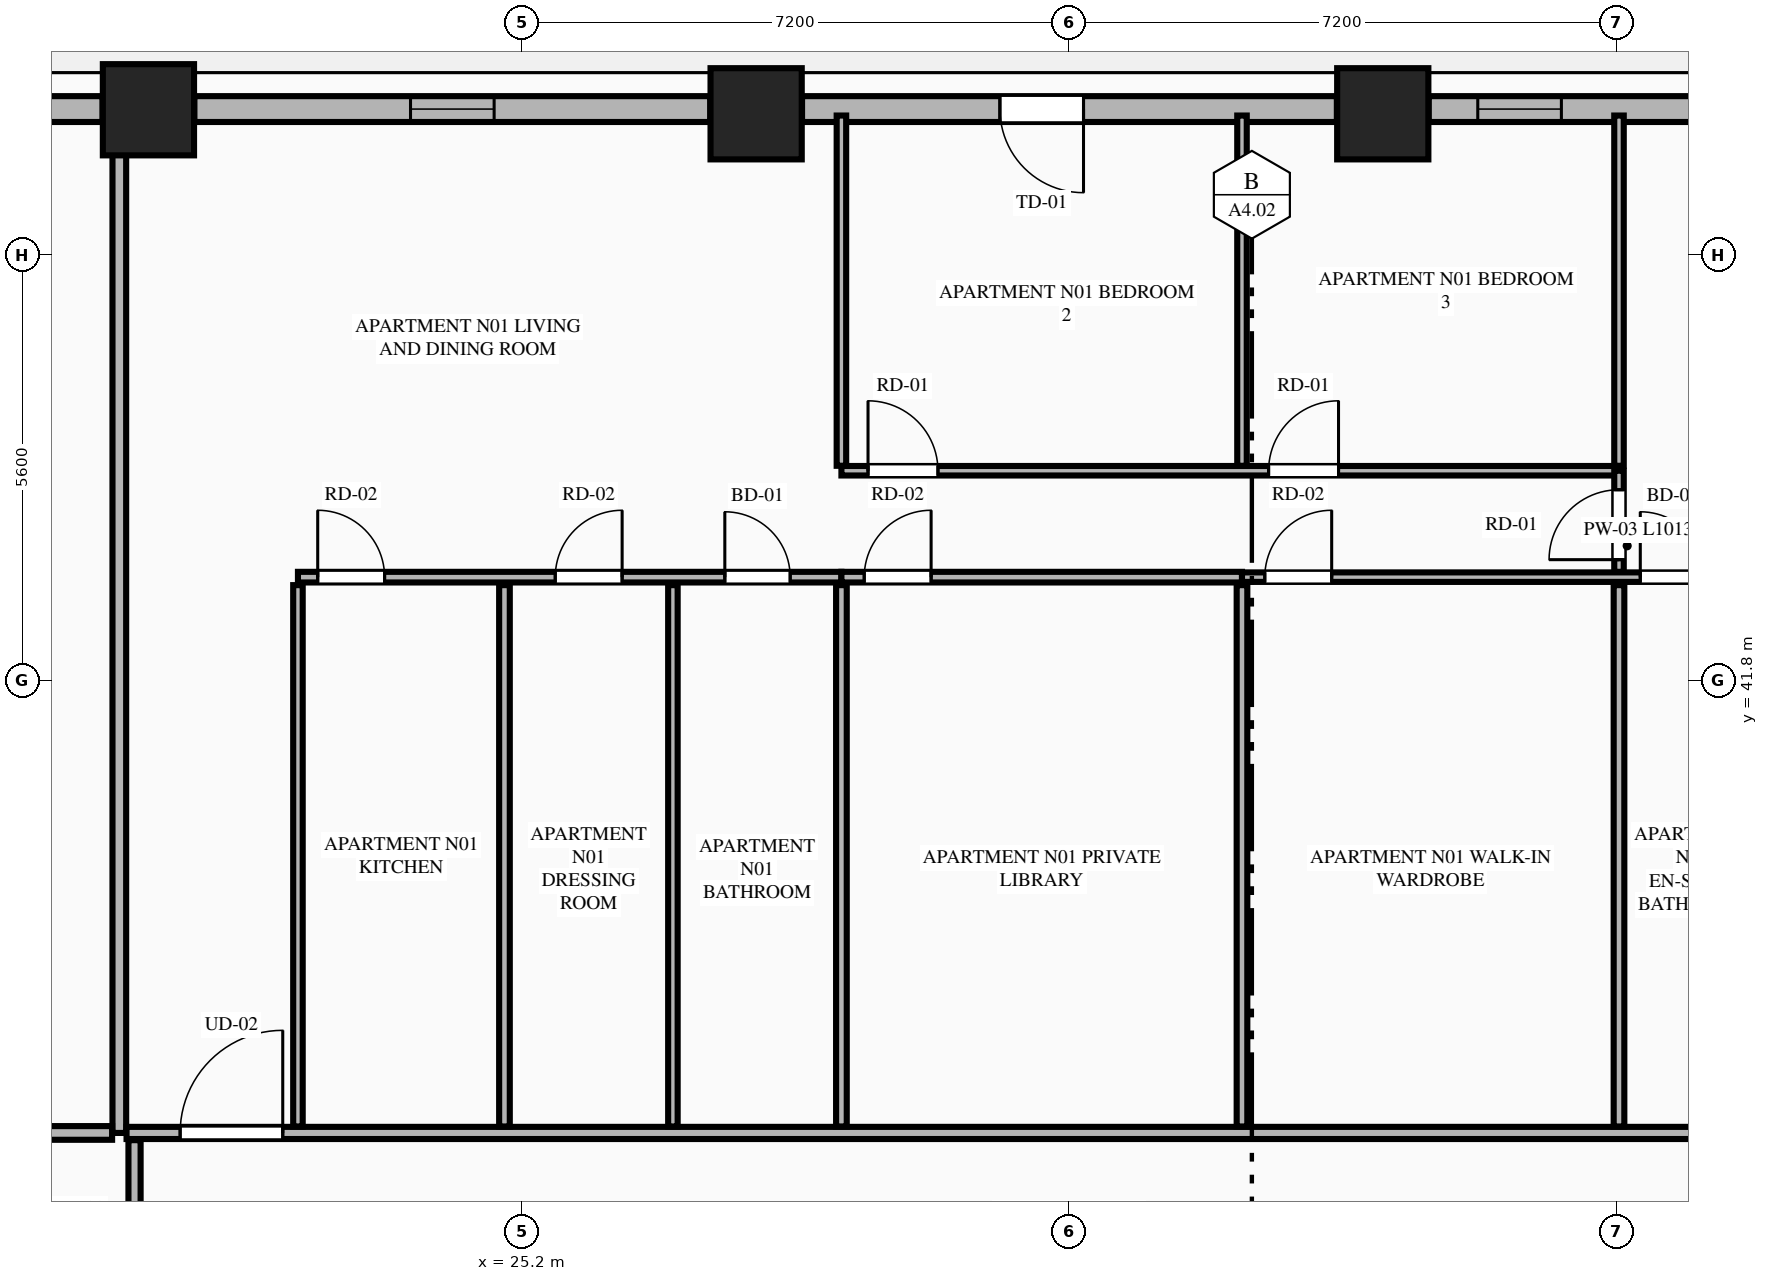
"""IFC4 building model, lengths in metres.
Left out: names, types, materials, properties, quantities, classifications, styles, units other than length and angle.
Written with IfcOpenShell. Run it as: python <this file> out.ifc"""

import sys

from ifc_helpers import new_model, si_unit, direction, frame, frame_2d, origin, origin_2d, place, context, subcontext, project, spatial, rectangle, extrude, element, fill, save


model = new_model("IFC4")
c1 = context("Model", 3, precision=1e-05, world=origin(), true_north=direction((0.0, 1.0)))
c2 = subcontext(c1, "Body", "Model", "MODEL_VIEW")
j1 = project(units=[si_unit("LENGTHUNIT", "METRE"), si_unit("PLANEANGLEUNIT", "RADIAN")], contexts=[c1])
p1 = place(None, origin())
s1 = spatial("IfcSite", under=j1, at=p1, CompositionType="ELEMENT")
p2 = place(p1, origin())
s2 = spatial("IfcBuilding", under=s1, at=p2, CompositionType="ELEMENT")
p3 = place(p2, frame((0.0, 0.0, 42.65)))
s3 = spatial("IfcBuildingStorey", under=s2, at=p3, CompositionType="ELEMENT", Elevation=42.65)
for number, where, z_axis, x_axis in (
    (1, (36.522, 49.258, 0.0), (0.0, 0.0, 1.0), (1.0, 0.0, 0.0)),
    (2, (28.278, 49.258, 0.0), (0.0, 0.0, 1.0), (1.0, 0.0, 0.0)),
    (3, (20.283, 49.311, 0.0), (0.0, 0.0, 1.0), (1.0, 0.0, 0.0)),
):
    element("IfcColumn", number, at=place(p3, frame(where, z_axis=z_axis, x_axis=x_axis)), inside=s3, PredefinedType="COLUMN", context=c2, shape_type="SweptSolid", body=[
        extrude(rectangle(XDim=1.2, YDim=1.2, at=origin_2d()), origin(), (0.0, 0.0, 1.0), 3.55),
    ])
p4 = place(p3, frame((43.913, 49.32, 0.0), z_axis=(0.0, 0.0, 1.0), x_axis=(-1.0, 0.0, 0.0)))
e4 = element("IfcWall", 4, at=p4, inside=s3, PredefinedType="STANDARD", context=c2, shape_type="SweptSolid", body=[
    extrude(rectangle(XDim=6.787, YDim=0.34, at=frame_2d((3.394, 0.0))), origin(), (0.0, 0.0, 1.0), 2.787),
])
p5 = place(p4, frame((1.535, 0.0, 0.75)))
e5 = element("IfcOpeningElement", 5, at=p5, cuts=e4, PredefinedType="OPENING", context=c2, shape_type="SweptSolid", body=[
    extrude(rectangle(XDim=1.1, YDim=1.887, at=frame_2d((0.55, 0.943))), frame((0.0, 0.18, 0.0), z_axis=(0.0, -1.0, 0.0), x_axis=(1.0, 0.0, 0.0)), (0.0, 0.0, 1.0), 0.36),
])
p6 = place(p4, frame((5.041, 0.0, 0.75)))
e6 = element("IfcOpeningElement", 6, at=p6, cuts=e4, PredefinedType="OPENING", context=c2, shape_type="SweptSolid", body=[
    extrude(rectangle(XDim=1.1, YDim=1.887, at=frame_2d((0.55, 0.943))), frame((0.0, 0.18, 0.0), z_axis=(0.0, -1.0, 0.0), x_axis=(1.0, 0.0, 0.0)), (0.0, 0.0, 1.0), 0.36),
])
p7 = place(p3, frame((35.918, 49.32, 0.0), z_axis=(0.0, 0.0, 1.0), x_axis=(-1.0, 0.0, 0.0)))
e7 = element("IfcWall", 7, at=p7, inside=s3, PredefinedType="STANDARD", context=c2, shape_type="SweptSolid", body=[
    extrude(rectangle(XDim=7.036, YDim=0.34, at=frame_2d((3.518, 0.0))), origin(), (0.0, 0.0, 1.0), 2.787),
])
p8 = place(p7, frame((3.333, 0.0, 0.0)))
e8 = element("IfcOpeningElement", 8, at=p8, cuts=e7, PredefinedType="OPENING", context=c2, shape_type="SweptSolid", body=[
    extrude(rectangle(XDim=1.1, YDim=2.25, at=frame_2d((0.55, 1.125))), frame((0.0, 0.18, 0.0), z_axis=(0.0, -1.0, 0.0), x_axis=(1.0, 0.0, 0.0)), (0.0, 0.0, 1.0), 0.36),
])
p9 = place(p3, frame((27.674, 49.32, 0.0), z_axis=(0.0, 0.0, 1.0), x_axis=(-1.0, 0.0, 0.0)))
e9 = element("IfcWall", 9, at=p9, inside=s3, PredefinedType="STANDARD", context=c2, shape_type="SweptSolid", body=[
    extrude(rectangle(XDim=6.787, YDim=0.34, at=frame_2d((3.394, 0.0))), origin(), (0.0, 0.0, 1.0), 2.787),
])
p10 = place(p9, frame((2.843, 0.0, 0.75)))
e10 = element("IfcOpeningElement", 10, at=p10, cuts=e9, PredefinedType="OPENING", context=c2, shape_type="SweptSolid", body=[
    extrude(rectangle(XDim=1.1, YDim=1.887, at=frame_2d((0.55, 0.943))), frame((0.0, 0.18, 0.0), z_axis=(0.0, -1.0, 0.0), x_axis=(1.0, 0.0, 0.0)), (0.0, 0.0, 1.0), 0.36),
])
p11 = place(p3, frame((19.679, 49.32, 0.0), z_axis=(0.0, 0.0, 1.0), x_axis=(-1.0, 0.0, 0.0)))
e11 = element("IfcWall", 11, at=p11, inside=s3, PredefinedType="STANDARD", context=c2, shape_type="SweptSolid", body=[
    extrude(rectangle(XDim=1.245, YDim=0.34, at=frame_2d((0.623, 0.0))), origin(), (0.0, 0.0, 1.0), 3.33),
])
p12 = place(p3, frame((19.9, 35.85, 0.0), z_axis=(0.0, 0.0, 1.0), x_axis=(0.0, 1.0, 0.0)))
e12 = element("IfcWall", 12, at=p12, inside=s3, PredefinedType="PARTITIONING", context=c2, shape_type="SweptSolid", body=[
    extrude(rectangle(XDim=13.295, YDim=0.18, at=frame_2d((6.647, 0.0))), origin(), (0.0, 0.0, 1.0), 3.33),
])
p13 = place(p3, frame((19.995, 35.85, 0.0), z_axis=(0.0, 0.0, 1.0), x_axis=(1.0, 0.0, 0.0)))
e13 = element("IfcWall", 13, at=p13, inside=s3, PredefinedType="PARTITIONING", context=c2, shape_type="SweptSolid", body=[
    extrude(rectangle(XDim=24.81, YDim=0.16, at=frame_2d((12.405, 0.0))), origin(), (0.0, 0.0, 1.0), 3.33),
])
p14 = place(p13, frame((0.705, 0.0, 0.0)))
e14 = element("IfcOpeningElement", 14, at=p14, cuts=e13, PredefinedType="OPENING", context=c2, shape_type="SweptSolid", body=[
    extrude(rectangle(XDim=1.35, YDim=2.35, at=frame_2d((0.675, 1.175))), frame((0.0, 0.09, 0.0), z_axis=(0.0, -1.0, 0.0), x_axis=(1.0, 0.0, 0.0)), (0.0, 0.0, 1.0), 0.18),
])
p15 = place(p3, frame((22.25, 35.935, 0.0), z_axis=(0.0, 0.0, 1.0), x_axis=(0.0, 1.0, 0.0)))
e15 = element("IfcWall", 15, at=p15, inside=s3, PredefinedType="PARTITIONING", context=c2, shape_type="SweptSolid", body=[
    extrude(rectangle(XDim=7.122, YDim=0.125, at=frame_2d((3.561, 0.0))), origin(), (0.0, 0.0, 1.0), 2.7),
])
p16 = place(p3, frame((22.25, 43.162, 0.0), z_axis=(0.0, 0.0, 1.0), x_axis=(1.0, 0.0, 0.0)))
e16 = element("IfcWall", 16, at=p16, inside=s3, PredefinedType="PLUMBINGWALL", context=c2, shape_type="SweptSolid", body=[
    extrude(rectangle(XDim=7.15, YDim=0.14, at=frame_2d((3.575, 0.0))), origin(), (0.0, 0.0, 1.0), 3.33),
])
p17 = place(p16, frame((5.616, 0.0, 0.0)))
e17 = element("IfcOpeningElement", 17, at=p17, cuts=e16, PredefinedType="OPENING", context=c2, shape_type="SweptSolid", body=[
    extrude(rectangle(XDim=0.86, YDim=2.1, at=frame_2d((0.43, 1.05))), frame((0.0, 0.08, 0.0), z_axis=(0.0, -1.0, 0.0), x_axis=(1.0, 0.0, 0.0)), (0.0, 0.0, 1.0), 0.16),
])
p18 = place(p16, frame((0.26, 0.0, 0.0)))
e18 = element("IfcOpeningElement", 18, at=p18, cuts=e16, PredefinedType="OPENING", context=c2, shape_type="SweptSolid", body=[
    extrude(rectangle(XDim=0.88, YDim=2.15, at=frame_2d((0.44, 1.075))), frame((0.0, 0.08, 0.0), z_axis=(0.0, -1.0, 0.0), x_axis=(1.0, 0.0, 0.0)), (0.0, 0.0, 1.0), 0.16),
])
p19 = place(p16, frame((3.385, 0.0, 0.0)))
e19 = element("IfcOpeningElement", 19, at=p19, cuts=e16, PredefinedType="OPENING", context=c2, shape_type="SweptSolid", body=[
    extrude(rectangle(XDim=0.88, YDim=2.15, at=frame_2d((0.44, 1.075))), frame((0.0, 0.08, 0.0), z_axis=(0.0, -1.0, 0.0), x_axis=(1.0, 0.0, 0.0)), (0.0, 0.0, 1.0), 0.16),
])
p20 = place(p3, frame((29.4, 43.162, 0.0), z_axis=(0.0, 0.0, 1.0), x_axis=(1.0, 0.0, 0.0)))
e20 = element("IfcWall", 20, at=p20, inside=s3, PredefinedType="PLUMBINGWALL", context=c2, shape_type="SweptSolid", body=[
    extrude(rectangle(XDim=5.27, YDim=0.14, at=frame_2d((2.635, 0.0))), origin(), (0.0, 0.0, 1.0), 3.33),
])
p21 = place(p20, frame((0.3, 0.0, 0.0)))
e21 = element("IfcOpeningElement", 21, at=p21, cuts=e20, PredefinedType="OPENING", context=c2, shape_type="SweptSolid", body=[
    extrude(rectangle(XDim=0.88, YDim=2.15, at=frame_2d((0.44, 1.075))), frame((0.0, 0.08, 0.0), z_axis=(0.0, -1.0, 0.0), x_axis=(1.0, 0.0, 0.0)), (0.0, 0.0, 1.0), 0.16),
])
p22 = place(p3, frame((34.67, 43.162, 0.0), z_axis=(0.0, 0.0, 1.0), x_axis=(1.0, 0.0, 0.0)))
e22 = element("IfcWall", 22, at=p22, inside=s3, PredefinedType="PARTITIONING", context=c2, shape_type="SweptSolid", body=[
    extrude(rectangle(XDim=10.135, YDim=0.125, at=frame_2d((5.067, 0.0))), origin(), (0.0, 0.0, 1.0), 3.33),
])
p23 = place(p22, frame((5.24, 0.0, 0.0)))
e23 = element("IfcOpeningElement", 23, at=p23, cuts=e22, PredefinedType="OPENING", context=c2, shape_type="SweptSolid", body=[
    extrude(rectangle(XDim=0.86, YDim=2.1, at=frame_2d((0.43, 1.05))), frame((0.0, 0.073, 0.0), z_axis=(0.0, -1.0, 0.0), x_axis=(1.0, 0.0, 0.0)), (0.0, 0.0, 1.0), 0.145),
])
p24 = place(p22, frame((7.17, 0.0, 0.0)))
e24 = element("IfcOpeningElement", 24, at=p24, cuts=e22, PredefinedType="OPENING", context=c2, shape_type="SweptSolid", body=[
    extrude(rectangle(XDim=0.88, YDim=2.15, at=frame_2d((0.44, 1.075))), frame((0.0, 0.073, 0.0), z_axis=(0.0, -1.0, 0.0), x_axis=(1.0, 0.0, 0.0)), (0.0, 0.0, 1.0), 0.145),
])
p25 = place(p22, frame((0.3, 0.0, 0.0)))
e25 = element("IfcOpeningElement", 25, at=p25, cuts=e22, PredefinedType="OPENING", context=c2, shape_type="SweptSolid", body=[
    extrude(rectangle(XDim=0.88, YDim=2.15, at=frame_2d((0.44, 1.075))), frame((0.0, 0.073, 0.0), z_axis=(0.0, -1.0, 0.0), x_axis=(1.0, 0.0, 0.0)), (0.0, 0.0, 1.0), 0.145),
])
p26 = place(p3, frame((24.967, 35.935, 0.0), z_axis=(0.0, 0.0, 1.0), x_axis=(0.0, 1.0, 0.0)))
e26 = element("IfcWall", 26, at=p26, inside=s3, PredefinedType="PLUMBINGWALL", context=c2, shape_type="SweptSolid", body=[
    extrude(rectangle(XDim=7.122, YDim=0.14, at=frame_2d((3.561, 0.0))), origin(), (0.0, 0.0, 1.0), 3.33),
])
p27 = place(p3, frame((27.183, 35.935, 0.0), z_axis=(0.0, 0.0, 1.0), x_axis=(0.0, 1.0, 0.0)))
e27 = element("IfcWall", 27, at=p27, inside=s3, PredefinedType="PARTITIONING", context=c2, shape_type="SweptSolid", body=[
    extrude(rectangle(XDim=7.122, YDim=0.125, at=frame_2d((3.561, 0.0))), origin(), (0.0, 0.0, 1.0), 3.33),
])
p28 = place(p3, frame((29.4, 44.627, 0.0), z_axis=(0.0, 0.0, 1.0), x_axis=(0.0, 1.0, 0.0)))
e28 = element("IfcWall", 28, at=p28, inside=s3, PredefinedType="PARTITIONING", context=c2, shape_type="SweptSolid", body=[
    extrude(rectangle(XDim=4.608, YDim=0.125, at=frame_2d((2.304, 0.0))), origin(), (0.0, 0.0, 1.0), 3.33),
])
p29 = place(p3, frame((29.4, 44.562, 0.0), z_axis=(0.0, 0.0, 1.0), x_axis=(1.0, 0.0, 0.0)))
e29 = element("IfcWall", 29, at=p29, inside=s3, PredefinedType="PARTITIONING", context=c2, shape_type="SweptSolid", body=[
    extrude(rectangle(XDim=10.23, YDim=0.125, at=frame_2d((5.115, 0.0))), origin(), (0.0, 0.0, 1.0), 3.33),
])
p30 = place(p29, frame((0.35, 0.0, 0.0)))
e30 = element("IfcOpeningElement", 30, at=p30, cuts=e29, PredefinedType="OPENING", context=c2, shape_type="SweptSolid", body=[
    extrude(rectangle(XDim=0.92, YDim=2.15, at=frame_2d((0.46, 1.075))), frame((0.0, 0.073, 0.0), z_axis=(0.0, -1.0, 0.0), x_axis=(1.0, 0.0, 0.0)), (0.0, 0.0, 1.0), 0.145),
])
p31 = place(p29, frame((5.62, 0.0, 0.0)))
e31 = element("IfcOpeningElement", 31, at=p31, cuts=e29, PredefinedType="OPENING", context=c2, shape_type="SweptSolid", body=[
    extrude(rectangle(XDim=0.92, YDim=2.15, at=frame_2d((0.46, 1.075))), frame((0.0, 0.073, 0.0), z_axis=(0.0, -1.0, 0.0), x_axis=(1.0, 0.0, 0.0)), (0.0, 0.0, 1.0), 0.145),
])
p32 = place(p3, frame((39.63, 43.232, 0.0), z_axis=(0.0, 0.0, 1.0), x_axis=(0.0, 1.0, 0.0)))
e32 = element("IfcWall", 32, at=p32, inside=s3, PredefinedType="PARTITIONING", context=c2, shape_type="SweptSolid", body=[
    extrude(rectangle(XDim=1.33, YDim=0.125, at=frame_2d((0.665, 0.0))), origin(), (0.0, 0.0, 1.0), 3.33),
])
p33 = place(p32, frame((0.16, 0.0, 0.0)))
e33 = element("IfcOpeningElement", 33, at=p33, cuts=e32, PredefinedType="OPENING", context=c2, shape_type="SweptSolid", body=[
    extrude(rectangle(XDim=0.92, YDim=2.15, at=frame_2d((0.46, 1.075))), frame((0.0, 0.073, 0.0), z_axis=(0.0, -1.0, 0.0), x_axis=(1.0, 0.0, 0.0)), (0.0, 0.0, 1.0), 0.145),
])
for number, where, z_axis, x_axis in (
    (34, (29.4, 35.935, 0.0), (0.0, 0.0, 1.0), (0.0, 1.0, 0.0)),
    (35, (34.67, 35.935, 0.0), (0.0, 0.0, 1.0), (0.0, 1.0, 0.0)),
):
    element("IfcWall", number, at=place(p3, frame(where, z_axis=z_axis, x_axis=x_axis)), inside=s3, PredefinedType="PLUMBINGWALL", context=c2, shape_type="SweptSolid", body=[
        extrude(rectangle(XDim=7.122, YDim=0.14, at=frame_2d((3.561, 0.0))), origin(), (0.0, 0.0, 1.0), 3.33),
    ])
for number, where, z_axis, x_axis in (
    (36, (34.67, 44.627, 0.0), (0.0, 0.0, 1.0), (0.0, 1.0, 0.0)),
    (37, (39.63, 44.627, 0.0), (0.0, 0.0, 1.0), (0.0, 1.0, 0.0)),
):
    element("IfcWall", number, at=place(p3, frame(where, z_axis=z_axis, x_axis=x_axis)), inside=s3, PredefinedType="PARTITIONING", context=c2, shape_type="SweptSolid", body=[
        extrude(rectangle(XDim=4.608, YDim=0.125, at=frame_2d((2.304, 0.0))), origin(), (0.0, 0.0, 1.0), 3.33),
    ])
p34 = place(p3, frame((39.63, 35.935, 0.0), z_axis=(0.0, 0.0, 1.0), x_axis=(0.0, 1.0, 0.0)))
e38 = element("IfcWall", 38, at=p34, inside=s3, PredefinedType="PLUMBINGWALL", context=c2, shape_type="SweptSolid", body=[
    extrude(rectangle(XDim=7.122, YDim=0.14, at=frame_2d((3.561, 0.0))), origin(), (0.0, 0.0, 1.0), 3.33),
])
p35 = place(p3, frame((10.665, 35.85, 0.0), z_axis=(0.0, 0.0, 1.0), x_axis=(1.0, 0.0, 0.0)))
e39 = element("IfcWall", 39, at=p35, inside=s3, PredefinedType="PARTITIONING", context=c2, shape_type="SweptSolid", body=[
    extrude(rectangle(XDim=9.14, YDim=0.18, at=frame_2d((4.57, 0.0))), origin(), (0.0, 0.0, 1.0), 3.33),
])
p36 = place(p3, frame((20.1, 29.577, 0.0), z_axis=(0.0, 0.0, 1.0), x_axis=(0.0, 1.0, 0.0)))
e40 = element("IfcWall", 40, at=p36, inside=s3, PredefinedType="PARTITIONING", context=c2, shape_type="SweptSolid", body=[
    extrude(rectangle(XDim=6.178, YDim=0.16, at=frame_2d((3.089, 0.0))), origin(), (0.0, 0.0, 1.0), 2.7),
])
p37 = place(p36, frame((0.4, 0.0, 0.0)))
e41 = element("IfcOpeningElement", 41, at=p37, cuts=e40, PredefinedType="OPENING", context=c2, shape_type="SweptSolid", body=[
    extrude(rectangle(XDim=1.02, YDim=2.25, at=frame_2d((0.51, 1.125))), frame((0.0, 0.09, 0.0), z_axis=(0.0, -1.0, 0.0), x_axis=(1.0, 0.0, 0.0)), (0.0, 0.0, 1.0), 0.18),
])
p38 = place(p8, origin())
e42 = element("IfcDoor", 42, at=p38, inside=s3, OperationType="SINGLE_SWING_LEFT", PredefinedType="DOOR", context=c2, shape_type="SweptSolid", body=[
    extrude(rectangle(XDim=1.1, YDim=2.25, at=frame_2d((0.55, 1.125))), frame((0.0, 0.025, 0.0), z_axis=(0.0, -1.0, 0.0), x_axis=(1.0, 0.0, 0.0)), (0.0, 0.0, 1.0), 0.05),
])
fill(e8, e42)
p39 = place(p10, origin())
e43 = element("IfcWindow", 43, at=p39, inside=s3, PartitioningType="SINGLE_PANEL", PredefinedType="WINDOW", context=c2, shape_type="SweptSolid", body=[
    extrude(rectangle(XDim=1.1, YDim=1.887, at=frame_2d((0.55, 0.943))), frame((0.0, 0.03, 0.0), z_axis=(0.0, -1.0, 0.0), x_axis=(1.0, 0.0, 0.0)), (0.0, 0.0, 1.0), 0.06),
])
fill(e10, e43)
p40 = place(p17, origin())
e44 = element("IfcDoor", 44, at=p40, inside=s3, OperationType="SINGLE_SWING_LEFT", PredefinedType="DOOR", context=c2, shape_type="SweptSolid", body=[
    extrude(rectangle(XDim=0.86, YDim=2.1, at=frame_2d((0.43, 1.05))), frame((0.0, 0.025, 0.0), z_axis=(0.0, -1.0, 0.0), x_axis=(1.0, 0.0, 0.0)), (0.0, 0.0, 1.0), 0.05),
])
fill(e17, e44)
p41 = place(p23, origin())
e45 = element("IfcDoor", 45, at=p41, inside=s3, OperationType="SINGLE_SWING_LEFT", PredefinedType="DOOR", context=c2, shape_type="SweptSolid", body=[
    extrude(rectangle(XDim=0.86, YDim=2.1, at=frame_2d((0.43, 1.05))), frame((0.0, 0.025, 0.0), z_axis=(0.0, -1.0, 0.0), x_axis=(1.0, 0.0, 0.0)), (0.0, 0.0, 1.0), 0.05),
])
fill(e23, e45)
p42 = place(p14, origin())
e46 = element("IfcDoor", 46, at=p42, inside=s3, OperationType="SINGLE_SWING_RIGHT", PredefinedType="DOOR", context=c2, shape_type="SweptSolid", body=[
    extrude(rectangle(XDim=1.35, YDim=2.35, at=frame_2d((0.675, 1.175))), frame((0.0, 0.025, 0.0), z_axis=(0.0, -1.0, 0.0), x_axis=(1.0, 0.0, 0.0)), (0.0, 0.0, 1.0), 0.05),
])
fill(e14, e46)
p43 = place(p18, origin())
e47 = element("IfcDoor", 47, at=p43, inside=s3, OperationType="SINGLE_SWING_LEFT", PredefinedType="DOOR", context=c2, shape_type="SweptSolid", body=[
    extrude(rectangle(XDim=0.88, YDim=2.15, at=frame_2d((0.44, 1.075))), frame((0.0, 0.025, 0.0), z_axis=(0.0, -1.0, 0.0), x_axis=(1.0, 0.0, 0.0)), (0.0, 0.0, 1.0), 0.05),
])
fill(e18, e47)
p44 = place(p19, origin())
e48 = element("IfcDoor", 48, at=p44, inside=s3, OperationType="SINGLE_SWING_RIGHT", PredefinedType="DOOR", context=c2, shape_type="SweptSolid", body=[
    extrude(rectangle(XDim=0.88, YDim=2.15, at=frame_2d((0.44, 1.075))), frame((0.0, 0.025, 0.0), z_axis=(0.0, -1.0, 0.0), x_axis=(1.0, 0.0, 0.0)), (0.0, 0.0, 1.0), 0.05),
])
fill(e19, e48)
p45 = place(p21, origin())
e49 = element("IfcDoor", 49, at=p45, inside=s3, OperationType="SINGLE_SWING_RIGHT", PredefinedType="DOOR", context=c2, shape_type="SweptSolid", body=[
    extrude(rectangle(XDim=0.88, YDim=2.15, at=frame_2d((0.44, 1.075))), frame((0.0, 0.025, 0.0), z_axis=(0.0, -1.0, 0.0), x_axis=(1.0, 0.0, 0.0)), (0.0, 0.0, 1.0), 0.05),
])
fill(e21, e49)
p46 = place(p30, origin())
e50 = element("IfcDoor", 50, at=p46, inside=s3, OperationType="SINGLE_SWING_LEFT", PredefinedType="DOOR", context=c2, shape_type="SweptSolid", body=[
    extrude(rectangle(XDim=0.92, YDim=2.15, at=frame_2d((0.46, 1.075))), frame((0.0, 0.025, 0.0), z_axis=(0.0, -1.0, 0.0), x_axis=(1.0, 0.0, 0.0)), (0.0, 0.0, 1.0), 0.05),
])
fill(e30, e50)
p47 = place(p31, origin())
e51 = element("IfcDoor", 51, at=p47, inside=s3, OperationType="SINGLE_SWING_RIGHT", PredefinedType="DOOR", context=c2, shape_type="SweptSolid", body=[
    extrude(rectangle(XDim=0.92, YDim=2.15, at=frame_2d((0.46, 1.075))), frame((0.0, 0.025, 0.0), z_axis=(0.0, -1.0, 0.0), x_axis=(1.0, 0.0, 0.0)), (0.0, 0.0, 1.0), 0.05),
])
fill(e31, e51)
p48 = place(p33, origin())
e52 = element("IfcDoor", 52, at=p48, inside=s3, OperationType="SINGLE_SWING_LEFT", PredefinedType="DOOR", context=c2, shape_type="SweptSolid", body=[
    extrude(rectangle(XDim=0.92, YDim=2.15, at=frame_2d((0.46, 1.075))), frame((0.0, 0.025, 0.0), z_axis=(0.0, -1.0, 0.0), x_axis=(1.0, 0.0, 0.0)), (0.0, 0.0, 1.0), 0.05),
])
fill(e33, e52)
p49 = place(p25, origin())
e53 = element("IfcDoor", 53, at=p49, inside=s3, OperationType="SINGLE_SWING_RIGHT", PredefinedType="DOOR", context=c2, shape_type="SweptSolid", body=[
    extrude(rectangle(XDim=0.88, YDim=2.15, at=frame_2d((0.44, 1.075))), frame((0.0, 0.025, 0.0), z_axis=(0.0, -1.0, 0.0), x_axis=(1.0, 0.0, 0.0)), (0.0, 0.0, 1.0), 0.05),
])
fill(e25, e53)
p50 = place(p6, origin())
e54 = element("IfcWindow", 54, at=p50, inside=s3, PartitioningType="SINGLE_PANEL", PredefinedType="WINDOW", context=c2, shape_type="SweptSolid", body=[
    extrude(rectangle(XDim=1.1, YDim=1.887, at=frame_2d((0.55, 0.943))), frame((0.0, 0.03, 0.0), z_axis=(0.0, -1.0, 0.0), x_axis=(1.0, 0.0, 0.0)), (0.0, 0.0, 1.0), 0.06),
])
fill(e6, e54)
save(model, sys.argv[1])
